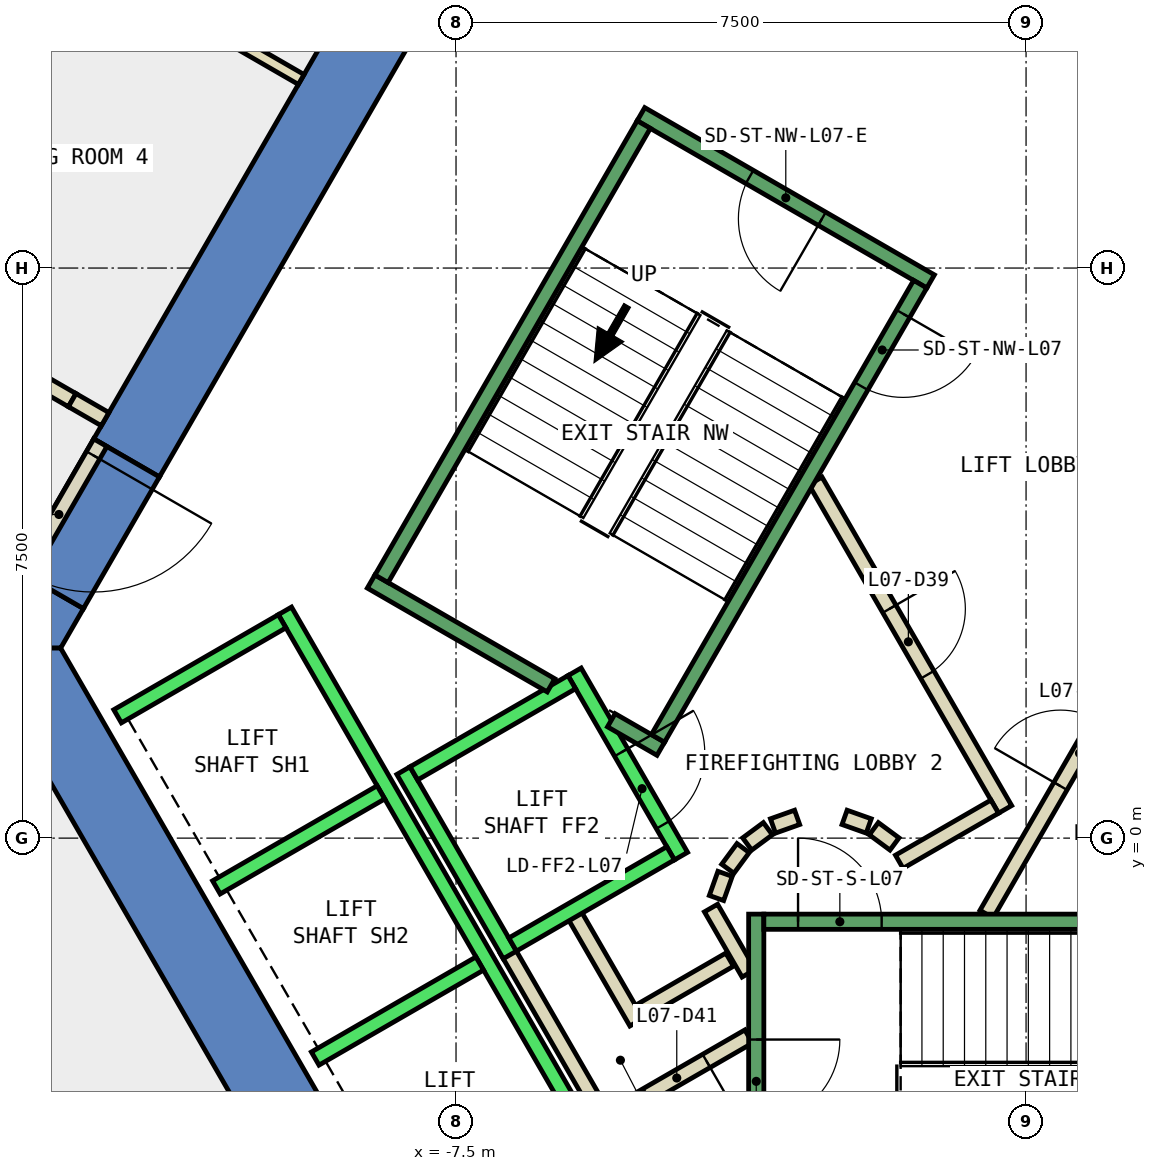
"""IFC4 building model, lengths in metres.
Left out: names, types, materials, properties, quantities, classifications, styles, units other than length and angle.
Written with IfcOpenShell. Run it as: python <this file> out.ifc"""

import sys

from ifc_helpers import new_model, si_unit, direction, frame, frame_2d, origin, place, context, subcontext, project, spatial, polyline, rectangle, outline, extrude, element, fill, save


model = new_model("IFC4")
c1 = context("Model", 3, precision=1e-05, world=origin(), true_north=direction((0.0, 1.0)))
c2 = subcontext(c1, "Body", "Model", "MODEL_VIEW")
j1 = project(units=[si_unit("LENGTHUNIT", "METRE"), si_unit("PLANEANGLEUNIT", "RADIAN")], contexts=[c1])
p1 = place(None, origin())
s1 = spatial("IfcSite", under=j1, at=p1, CompositionType="ELEMENT")
p2 = place(p1, origin())
s2 = spatial("IfcBuilding", under=s1, at=p2, CompositionType="ELEMENT")
p3 = place(p2, frame((0.0, 0.0, 39.2)))
s3 = spatial("IfcBuildingStorey", under=s2, at=p3, CompositionType="ELEMENT", Elevation=39.2)
p4 = place(p3, frame((0.0, 0.0, -0.4)))
e1 = element("IfcWall", 1, at=p4, inside=s3, PredefinedType="SHEAR", context=c2, shape_type="SweptSolid", body=[
    extrude(outline(polyline([(-12.267, 5.252), (-11.402, 4.752), (-6.351, 13.5), (-6.928, 14.5), (-12.267, 5.252)])), origin(), (0.0, 0.0, 1.0), 4.2),
])
p5 = place(p3, frame((0.0, 0.0, -0.4)))
e2 = element("IfcWall", 2, at=p5, inside=s3, PredefinedType="SHEAR", context=c2, shape_type="SweptSolid", body=[
    extrude(outline(polyline([(-12.402, 3.02), (-13.267, 3.52), (-13.856, 2.5), (-12.702, 2.5), (-12.402, 3.02)])), origin(), (0.0, 0.0, 1.0), 4.2),
])
p6 = place(p3, frame((0.0, 0.0, 3.6)))
e3 = element("IfcWall", 3, at=p6, inside=s3, PredefinedType="SHEAR", context=c2, shape_type="SweptSolid", body=[
    extrude(outline(polyline([(-13.267, 3.52), (-12.402, 3.02), (-11.402, 4.752), (-12.267, 5.252), (-13.267, 3.52)])), origin(), (0.0, 0.0, 1.0), 0.2),
])
p7 = place(p3, frame((0.0, 0.0, -0.4)))
e4 = element("IfcWall", 4, at=p7, inside=s3, PredefinedType="SHEAR", context=c2, shape_type="SweptSolid", body=[
    extrude(outline(polyline([(-13.856, 2.5), (-6.928, -9.5), (-6.351, -8.5), (-12.702, 2.5), (-13.856, 2.5)])), origin(), (0.0, 0.0, 1.0), 4.2),
])
p8 = place(p3, frame((-15.963, 7.733, 0.0), z_axis=(0.0, 0.0, 1.0), x_axis=(0.865965832374, -0.500103166518, 0.0)))
e5 = element("IfcWall", 5, at=p8, inside=s3, PredefinedType="PARTITIONING", context=c2, shape_type="SweptSolid", body=[
    extrude(rectangle(XDim=3.941, YDim=0.2, at=frame_2d((1.971, 0.0))), origin(), (0.0, 0.0, 1.0), 3.8),
])
p9 = place(p3, frame((-3.9, -1.599, 0.0), z_axis=(0.0, 0.0, 1.0), x_axis=(-0.865969445389, -0.500096910261, 0.0)))
e6 = element("IfcWall", 6, at=p9, inside=s3, PredefinedType="PARTITIONING", context=c2, shape_type="SweptSolid", body=[
    extrude(rectangle(XDim=1.373, YDim=0.2, at=frame_2d((0.687, 0.0))), origin(), (0.0, 0.0, 1.0), 3.8),
])
p10 = place(p3, frame((-5.126, -2.422, 0.0), z_axis=(0.0, 0.0, 1.0), x_axis=(-0.500062241894, 0.865989465428, 0.0)))
e7 = element("IfcWall", 7, at=p10, inside=s3, PredefinedType="PARTITIONING", context=c2, shape_type="SweptSolid", body=[
    extrude(rectangle(XDim=1.7, YDim=0.2, at=frame_2d((0.85, 0.0))), origin(), (0.0, 0.0, 1.0), 3.8),
])
p11 = place(p3, frame((-3.65, -2.61, 0.0), z_axis=(0.0, 0.0, 1.0), x_axis=(-0.866072462134, -0.499918483688, 0.0)))
e8 = element("IfcWall", 8, at=p11, inside=s3, PredefinedType="PARTITIONING", context=c2, shape_type="SweptSolid", body=[
    extrude(rectangle(XDim=2.084, YDim=0.2, at=frame_2d((1.042, 0.0))), origin(), (0.0, 0.0, 1.0), 3.8),
])
p12 = place(p11, frame((0.642, 0.0, 0.0)))
e9 = element("IfcOpeningElement", 9, at=p12, cuts=e8, PredefinedType="OPENING", context=c2, shape_type="SweptSolid", body=[
    extrude(rectangle(XDim=0.9, YDim=2.1, at=frame_2d((0.45, 1.05))), frame((0.0, 0.11, 0.0), z_axis=(0.0, -1.0, 0.0), x_axis=(1.0, 0.0, 0.0)), (0.0, 0.0, 1.0), 0.22),
])
p13 = place(p3, frame((-5.492, -3.788, 0.0), z_axis=(0.0, 0.0, 1.0), x_axis=(-0.500008949224, 0.866020236886, 0.0)))
e10 = element("IfcWall", 10, at=p13, inside=s3, PredefinedType="PARTITIONING", context=c2, shape_type="SweptSolid", body=[
    extrude(rectangle(XDim=2.68, YDim=0.2, at=frame_2d((1.34, 0.0))), origin(), (0.0, 0.0, 1.0), 3.8),
])
p14 = place(p3, frame((-4.145, -0.92, 0.0), z_axis=(0.0, 0.0, 1.0), x_axis=(0.499743786207, -0.866173278362, 0.0)))
e11 = element("IfcWall", 11, at=p14, inside=s3, PredefinedType="PARTITIONING", context=c2, shape_type="SweptSolid", body=[
    extrude(rectangle(XDim=0.991, YDim=0.2, at=frame_2d((0.495, 0.0))), origin(), (0.0, 0.0, 1.0), 3.8),
])
p15 = place(p3, frame((-13.554, 12.3, 0.0), z_axis=(0.0, 0.0, 1.0), x_axis=(0.866028685375, -0.499994316075, 0.0)))
e12 = element("IfcWall", 12, at=p15, inside=s3, PredefinedType="PARTITIONING", context=c2, shape_type="SweptSolid", body=[
    extrude(rectangle(XDim=4.638, YDim=0.15, at=frame_2d((2.319, 0.0))), origin(), (0.0, 0.0, 1.0), 3.8),
])
p16 = place(p3, frame((-0.52, -1.0, 0.0), z_axis=(0.0, 0.0, 1.0), x_axis=(0.50011622646, 0.865958290007, 0.0)))
e13 = element("IfcWall", 13, at=p16, inside=s3, PredefinedType="PARTITIONING", context=c2, shape_type="SweptSolid", body=[
    extrude(rectangle(XDim=4.991, YDim=0.2, at=frame_2d((2.496, 0.0))), origin(), (0.0, 0.0, 1.0), 3.8),
])
p17 = place(p16, frame((1.945, 0.0, 0.0)))
e14 = element("IfcOpeningElement", 14, at=p17, cuts=e13, PredefinedType="OPENING", context=c2, shape_type="SweptSolid", body=[
    extrude(rectangle(XDim=1.0, YDim=2.1, at=frame_2d((0.5, 1.05))), frame((0.0, 0.11, 0.0), z_axis=(0.0, -1.0, 0.0), x_axis=(1.0, 0.0, 0.0)), (0.0, 0.0, 1.0), 0.22),
])
p18 = place(p3, frame((-2.771, 4.7, 0.0), z_axis=(0.0, 0.0, 1.0), x_axis=(0.499969479948, -0.866043023828, 0.0)))
e15 = element("IfcWall", 15, at=p18, inside=s3, PredefinedType="PARTITIONING", context=c2, shape_type="SweptSolid", body=[
    extrude(rectangle(XDim=4.99, YDim=0.2, at=frame_2d((2.495, 0.0))), origin(), (0.0, 0.0, 1.0), 3.8),
])
p19 = place(p18, frame((1.945, 0.0, 0.0)))
e16 = element("IfcOpeningElement", 16, at=p19, cuts=e15, PredefinedType="OPENING", context=c2, shape_type="SweptSolid", body=[
    extrude(rectangle(XDim=1.0, YDim=2.1, at=frame_2d((0.5, 1.05))), frame((0.0, 0.11, 0.0), z_axis=(0.0, -1.0, 0.0), x_axis=(1.0, 0.0, 0.0)), (0.0, 0.0, 1.0), 0.22),
])
p20 = place(p3, frame((-0.412, 0.414, 0.0), z_axis=(0.0, 0.0, 1.0), x_axis=(-0.866017369001, -0.500013916395, 0.0)))
e17 = element("IfcWall", 17, at=p20, inside=s3, PredefinedType="PARTITIONING", context=c2, shape_type="SweptSolid", body=[
    extrude(rectangle(XDim=1.45, YDim=0.2, at=frame_2d((0.725, 0.0))), origin(), (0.0, 0.0, 1.0), 3.8),
])
p21 = place(p3, frame((-1.731, -0.077, 0.0), z_axis=(0.0, 0.0, 1.0), x_axis=(-0.804311165252, 0.594208338422, 0.0)))
e18 = element("IfcWall", 18, at=p21, inside=s3, PredefinedType="PARTITIONING", context=c2, shape_type="SweptSolid", body=[
    extrude(rectangle(XDim=0.338, YDim=0.2, at=frame_2d((0.169, 0.0))), origin(), (0.0, 0.0, 1.0), 3.8),
])
p22 = place(p3, frame((-2.07, 0.16, 0.0), z_axis=(0.0, 0.0, 1.0), x_axis=(-0.942199461132, 0.335052496547, 0.0)))
e19 = element("IfcWall", 19, at=p22, inside=s3, PredefinedType="PARTITIONING", context=c2, shape_type="SweptSolid", body=[
    extrude(rectangle(XDim=0.337, YDim=0.2, at=frame_2d((0.169, 0.0))), origin(), (0.0, 0.0, 1.0), 3.8),
])
p23 = place(p3, frame((-3.012, 0.273, 0.0), z_axis=(0.0, 0.0, 1.0), x_axis=(-0.942280615813, -0.334824194261, 0.0)))
e20 = element("IfcWall", 20, at=p23, inside=s3, PredefinedType="PARTITIONING", context=c2, shape_type="SweptSolid", body=[
    extrude(rectangle(XDim=0.338, YDim=0.2, at=frame_2d((0.169, 0.0))), origin(), (0.0, 0.0, 1.0), 3.8),
])
p24 = place(p3, frame((-3.397, 0.124, 0.0), z_axis=(0.0, 0.0, 1.0), x_axis=(-0.804311165252, -0.594208338422, 0.0)))
e21 = element("IfcWall", 21, at=p24, inside=s3, PredefinedType="PARTITIONING", context=c2, shape_type="SweptSolid", body=[
    extrude(rectangle(XDim=0.338, YDim=0.2, at=frame_2d((0.169, 0.0))), origin(), (0.0, 0.0, 1.0), 3.8),
])
p25 = place(p3, frame((-3.723, -0.131, 0.0), z_axis=(0.0, 0.0, 1.0), x_axis=(-0.594675113454, -0.803966112121, 0.0)))
e22 = element("IfcWall", 22, at=p25, inside=s3, PredefinedType="PARTITIONING", context=c2, shape_type="SweptSolid", body=[
    extrude(rectangle(XDim=0.338, YDim=0.2, at=frame_2d((0.169, 0.0))), origin(), (0.0, 0.0, 1.0), 3.8),
])
p26 = place(p3, frame((-3.96, -0.47, 0.0), z_axis=(0.0, 0.0, 1.0), x_axis=(-0.334824194261, -0.942280615813, 0.0)))
e23 = element("IfcWall", 23, at=p26, inside=s3, PredefinedType="PARTITIONING", context=c2, shape_type="SweptSolid", body=[
    extrude(rectangle(XDim=0.338, YDim=0.2, at=frame_2d((0.169, 0.0))), origin(), (0.0, 0.0, 1.0), 3.8),
])
p27 = place(p3, frame((-12.18, 5.202, 0.0), z_axis=(0.0, 0.0, 1.0), x_axis=(-0.50002537861, -0.866010750942, 0.0)))
e24 = element("IfcWall", 24, at=p27, inside=s3, PredefinedType="PARTITIONING", context=c2, shape_type="SweptSolid", body=[
    extrude(rectangle(XDim=2.0, YDim=0.2, at=frame_2d((1.0, 0.0))), origin(), (0.0, 0.0, 1.0), 2.4),
])
p28 = place(p27, frame((0.19, 0.0, 0.0)))
e25 = element("IfcOpeningElement", 25, at=p28, cuts=e24, PredefinedType="OPENING", context=c2, shape_type="SweptSolid", body=[
    extrude(rectangle(XDim=1.8, YDim=2.1, at=frame_2d((0.9, 1.05))), frame((0.0, 0.11, 0.0), z_axis=(0.0, -1.0, 0.0), x_axis=(1.0, 0.0, 0.0)), (0.0, 0.0, 1.0), 0.22),
])
p29 = place(p3, frame((-12.55, 5.762, 0.0), z_axis=(0.0, 0.0, 1.0), x_axis=(0.866071776036, -0.499919672301, 0.0)))
e26 = element("IfcWall", 26, at=p29, inside=s3, PredefinedType="PARTITIONING", context=c2, shape_type="SweptSolid", body=[
    extrude(rectangle(XDim=0.5, YDim=0.2, at=frame_2d((0.25, 0.0))), origin(), (0.0, 0.0, 1.0), 2.4),
])
p30 = place(p3, frame((-5.94, 2.188, 0.0), z_axis=(0.0, 0.0, 1.0), x_axis=(0.49994636267, -0.866056369097, 0.0)))
e27 = element("IfcWall", 27, at=p30, inside=s3, PredefinedType="STANDARD", context=c2, shape_type="SweptSolid", body=[
    extrude(rectangle(XDim=2.8, YDim=0.2, at=frame_2d((1.4, 0.0))), origin(), (0.0, 0.0, 1.0), 3.8),
])
p31 = place(p30, frame((1.225, 0.0, 0.0)))
e28 = element("IfcOpeningElement", 28, at=p31, cuts=e27, PredefinedType="OPENING", context=c2, shape_type="SweptSolid", body=[
    extrude(rectangle(XDim=1.1, YDim=2.1, at=frame_2d((0.55, 1.05))), frame((0.0, 0.11, 0.0), z_axis=(0.0, -1.0, 0.0), x_axis=(1.0, 0.0, 0.0)), (0.0, 0.0, 1.0), 0.22),
])
p32 = place(p3, frame((-8.192, 0.888, 0.0), z_axis=(0.0, 0.0, 1.0), x_axis=(0.49994636267, -0.866056369097, 0.0)))
e29 = element("IfcWall", 29, at=p32, inside=s3, PredefinedType="STANDARD", context=c2, shape_type="SweptSolid", body=[
    extrude(rectangle(XDim=2.8, YDim=0.2, at=frame_2d((1.4, 0.0))), origin(), (0.0, 0.0, 1.0), 3.8),
])
for number, where, z_axis, x_axis in (
    (30, (-5.977, 2.052, 0.0), (0.0, 0.0, 1.0), (-0.866, -0.5, 0.0)),
    (31, (-4.677, -0.2, 0.0), (0.0, 0.0, 1.0), (-0.866, -0.5, 0.0)),
):
    element("IfcWall", number, at=place(p3, frame(where, z_axis=z_axis, x_axis=x_axis)), inside=s3, PredefinedType="STANDARD", context=c2, shape_type="SweptSolid", body=[
        extrude(rectangle(XDim=2.399, YDim=0.2, at=frame_2d((1.2, 0.0))), origin(), (0.0, 0.0, 1.0), 3.8),
    ])
p33 = place(p3, frame((-9.751, 2.99, 0.0), z_axis=(0.0, 0.0, 1.0), x_axis=(0.50000090737, -0.866024879913, 0.0)))
e32 = element("IfcWall", 32, at=p33, inside=s3, PredefinedType="STANDARD", context=c2, shape_type="SweptSolid", body=[
    extrude(rectangle(XDim=10.6, YDim=0.2, at=frame_2d((5.3, 0.0))), origin(), (0.0, 0.0, 1.0), 3.8),
])
p34 = place(p3, frame((-9.788, 2.853, 0.0), z_axis=(0.0, 0.0, 1.0), x_axis=(-0.865998541277, -0.500046524342, 0.0)))
e33 = element("IfcWall", 33, at=p34, inside=s3, PredefinedType="STANDARD", context=c2, shape_type="SweptSolid", body=[
    extrude(rectangle(XDim=2.5, YDim=0.2, at=frame_2d((1.25, 0.0))), origin(), (0.0, 0.0, 1.0), 3.8),
])
for number, where, z_axis, x_axis in (
    (34, (-8.488, 0.602, 0.0), (0.0, 0.0, 1.0), (-0.866, -0.5, 0.0)),
    (35, (-7.188, -1.65, 0.0), (0.0, 0.0, 1.0), (-0.866, -0.5, 0.0)),
):
    element("IfcWall", number, at=place(p3, frame(where, z_axis=z_axis, x_axis=x_axis)), inside=s3, PredefinedType="STANDARD", context=c2, shape_type="SweptSolid", body=[
        extrude(rectangle(XDim=2.5, YDim=0.2, at=frame_2d((1.25, 0.0))), origin(), (0.0, 0.0, 1.0), 3.8),
    ])
p35 = place(p3, frame((-3.55, -1.0, 0.0), z_axis=(0.0, 0.0, 1.0), x_axis=(0.0, -1.0, 0.0)))
e36 = element("IfcWall", 36, at=p35, inside=s3, PredefinedType="STANDARD", context=c2, shape_type="SweptSolid", body=[
    extrude(rectangle(XDim=4.4, YDim=0.2, at=frame_2d((2.2, 0.0))), origin(), (0.0, 0.0, 1.0), 3.8),
])
p36 = place(p35, frame((1.65, 0.0, 0.0)))
e37 = element("IfcOpeningElement", 37, at=p36, cuts=e36, PredefinedType="OPENING", context=c2, shape_type="SweptSolid", body=[
    extrude(rectangle(XDim=1.1, YDim=2.2, at=frame_2d((0.55, 1.1))), frame((0.0, 0.11, 0.0), z_axis=(0.0, -1.0, 0.0), x_axis=(1.0, 0.0, 0.0)), (0.0, 0.0, 1.0), 0.22),
])
p37 = place(p3, frame((-3.45, -1.1, 0.0), z_axis=(0.0, 0.0, 1.0), x_axis=(1.0, 0.0, 0.0)))
e38 = element("IfcWall", 38, at=p37, inside=s3, PredefinedType="STANDARD", context=c2, shape_type="SweptSolid", body=[
    extrude(rectangle(XDim=6.9, YDim=0.2, at=frame_2d((3.45, 0.0))), origin(), (0.0, 0.0, 1.0), 3.8),
])
p38 = place(p37, frame((0.45, 0.0, 0.0)))
e39 = element("IfcOpeningElement", 39, at=p38, cuts=e38, PredefinedType="OPENING", context=c2, shape_type="SweptSolid", body=[
    extrude(rectangle(XDim=1.1, YDim=2.2, at=frame_2d((0.55, 1.1))), frame((0.0, 0.11, 0.0), z_axis=(0.0, -1.0, 0.0), x_axis=(1.0, 0.0, 0.0)), (0.0, 0.0, 1.0), 0.22),
])
p39 = place(p3, frame((-1.256, 7.324, 0.0), z_axis=(0.0, 0.0, 1.0), x_axis=(-0.866046073146, 0.499964197906, 0.0)))
e40 = element("IfcWall", 40, at=p39, inside=s3, PredefinedType="STANDARD", context=c2, shape_type="SweptSolid", body=[
    extrude(rectangle(XDim=4.4, YDim=0.2, at=frame_2d((2.2, 0.0))), origin(), (0.0, 0.0, 1.0), 3.8),
])
p40 = place(p39, frame((1.65, 0.0, 0.0)))
e41 = element("IfcOpeningElement", 41, at=p40, cuts=e40, PredefinedType="OPENING", context=c2, shape_type="SweptSolid", body=[
    extrude(rectangle(XDim=1.1, YDim=2.2, at=frame_2d((0.55, 1.1))), frame((0.0, 0.11, 0.0), z_axis=(0.0, -1.0, 0.0), x_axis=(1.0, 0.0, 0.0)), (0.0, 0.0, 1.0), 0.22),
])
p41 = place(p3, frame((-6.25, 2.01, 0.0), z_axis=(0.0, 0.0, 1.0), x_axis=(-0.86611865017, 0.499838457731, 0.0)))
e42 = element("IfcWall", 42, at=p41, inside=s3, PredefinedType="STANDARD", context=c2, shape_type="SweptSolid", body=[
    extrude(rectangle(XDim=2.733, YDim=0.2, at=frame_2d((1.366, 0.0))), origin(), (0.0, 0.0, 1.0), 3.8),
])
p42 = place(p3, frame((-4.806, 1.176, 0.0), z_axis=(0.0, 0.0, 1.0), x_axis=(-0.866558586415, 0.499075361355, 0.0)))
e43 = element("IfcWall", 43, at=p42, inside=s3, PredefinedType="STANDARD", context=c2, shape_type="SweptSolid", body=[
    extrude(rectangle(XDim=0.751, YDim=0.2, at=frame_2d((0.376, 0.0))), origin(), (0.0, 0.0, 1.0), 3.8),
])
p43 = place(p3, frame((-1.393, 7.288, 0.0), z_axis=(0.0, 0.0, 1.0), x_axis=(-0.499963383562, -0.866046543262, 0.0)))
e44 = element("IfcWall", 44, at=p43, inside=s3, PredefinedType="STANDARD", context=c2, shape_type="SweptSolid", body=[
    extrude(rectangle(XDim=6.9, YDim=0.2, at=frame_2d((3.45, 0.0))), origin(), (0.0, 0.0, 1.0), 3.8),
])
p44 = place(p43, frame((0.45, 0.0, 0.0)))
e45 = element("IfcOpeningElement", 45, at=p44, cuts=e44, PredefinedType="OPENING", context=c2, shape_type="SweptSolid", body=[
    extrude(rectangle(XDim=1.1, YDim=2.2, at=frame_2d((0.55, 1.1))), frame((0.0, 0.11, 0.0), z_axis=(0.0, -1.0, 0.0), x_axis=(1.0, 0.0, 0.0)), (0.0, 0.0, 1.0), 0.22),
])
p45 = place(p3, frame((-5.03, 9.388, 0.0), z_axis=(0.0, 0.0, 1.0), x_axis=(-0.499978703459, -0.866037698999, 0.0)))
e46 = element("IfcWall", 46, at=p45, inside=s3, PredefinedType="STANDARD", context=c2, shape_type="SweptSolid", body=[
    extrude(rectangle(XDim=6.9, YDim=0.2, at=frame_2d((3.45, 0.0))), origin(), (0.0, 0.0, 1.0), 3.8),
])
p46 = place(p17, origin())
e47 = element("IfcDoor", 47, at=p46, inside=s3, OperationType="SINGLE_SWING_LEFT", PredefinedType="DOOR", context=c2, shape_type="SweptSolid", body=[
    extrude(rectangle(XDim=1.0, YDim=2.1, at=frame_2d((0.5, 1.05))), frame((0.0, 0.025, 0.0), z_axis=(0.0, -1.0, 0.0), x_axis=(1.0, 0.0, 0.0)), (0.0, 0.0, 1.0), 0.05),
])
fill(e14, e47)
p47 = place(p19, origin())
e48 = element("IfcDoor", 48, at=p47, inside=s3, OperationType="SINGLE_SWING_RIGHT", PredefinedType="DOOR", context=c2, shape_type="SweptSolid", body=[
    extrude(rectangle(XDim=1.0, YDim=2.1, at=frame_2d((0.5, 1.05))), frame((0.0, 0.025, 0.0), z_axis=(0.0, -1.0, 0.0), x_axis=(1.0, 0.0, 0.0)), (0.0, 0.0, 1.0), 0.05),
])
fill(e16, e48)
p48 = place(p12, origin())
e49 = element("IfcDoor", 49, at=p48, inside=s3, OperationType="SINGLE_SWING_LEFT", PredefinedType="DOOR", context=c2, shape_type="SweptSolid", body=[
    extrude(rectangle(XDim=0.9, YDim=2.1, at=frame_2d((0.45, 1.05))), frame((0.0, 0.025, 0.0), z_axis=(0.0, -1.0, 0.0), x_axis=(1.0, 0.0, 0.0)), (0.0, 0.0, 1.0), 0.05),
])
fill(e9, e49)
p49 = place(p28, origin())
e50 = element("IfcDoor", 50, at=p49, inside=s3, OperationType="DOUBLE_DOOR_SINGLE_SWING", PredefinedType="DOOR", context=c2, shape_type="SweptSolid", body=[
    extrude(rectangle(XDim=1.8, YDim=2.1, at=frame_2d((0.9, 1.05))), frame((0.0, 0.025, 0.0), z_axis=(0.0, -1.0, 0.0), x_axis=(1.0, 0.0, 0.0)), (0.0, 0.0, 1.0), 0.05),
])
fill(e25, e50)
p50 = place(p31, origin())
e51 = element("IfcDoor", 51, at=p50, inside=s3, OperationType="SLIDING_TO_LEFT", PredefinedType="DOOR", context=c2, shape_type="SweptSolid", body=[
    extrude(rectangle(XDim=1.1, YDim=2.1, at=frame_2d((0.55, 1.05))), frame((0.0, 0.025, 0.0), z_axis=(0.0, -1.0, 0.0), x_axis=(1.0, 0.0, 0.0)), (0.0, 0.0, 1.0), 0.05),
])
fill(e28, e51)
p51 = place(p38, origin())
e52 = element("IfcDoor", 52, at=p51, inside=s3, OperationType="SINGLE_SWING_LEFT", PredefinedType="DOOR", context=c2, shape_type="SweptSolid", body=[
    extrude(rectangle(XDim=1.1, YDim=2.2, at=frame_2d((0.55, 1.1))), frame((0.0, 0.025, 0.0), z_axis=(0.0, -1.0, 0.0), x_axis=(1.0, 0.0, 0.0)), (0.0, 0.0, 1.0), 0.05),
])
fill(e39, e52)
p52 = place(p36, origin())
e53 = element("IfcDoor", 53, at=p52, inside=s3, OperationType="SINGLE_SWING_LEFT", PredefinedType="DOOR", context=c2, shape_type="SweptSolid", body=[
    extrude(rectangle(XDim=1.1, YDim=2.2, at=frame_2d((0.55, 1.1))), frame((0.0, 0.025, 0.0), z_axis=(0.0, -1.0, 0.0), x_axis=(1.0, 0.0, 0.0)), (0.0, 0.0, 1.0), 0.05),
])
fill(e37, e53)
p53 = place(p44, origin())
e54 = element("IfcDoor", 54, at=p53, inside=s3, OperationType="SINGLE_SWING_LEFT", PredefinedType="DOOR", context=c2, shape_type="SweptSolid", body=[
    extrude(rectangle(XDim=1.1, YDim=2.2, at=frame_2d((0.55, 1.1))), frame((0.0, 0.025, 0.0), z_axis=(0.0, -1.0, 0.0), x_axis=(1.0, 0.0, 0.0)), (0.0, 0.0, 1.0), 0.05),
])
fill(e45, e54)
p54 = place(p40, origin())
e55 = element("IfcDoor", 55, at=p54, inside=s3, OperationType="SINGLE_SWING_LEFT", PredefinedType="DOOR", context=c2, shape_type="SweptSolid", body=[
    extrude(rectangle(XDim=1.1, YDim=2.2, at=frame_2d((0.55, 1.1))), frame((0.0, 0.025, 0.0), z_axis=(0.0, -1.0, 0.0), x_axis=(1.0, 0.0, 0.0)), (0.0, 0.0, 1.0), 0.05),
])
fill(e41, e55)
save(model, sys.argv[1])
